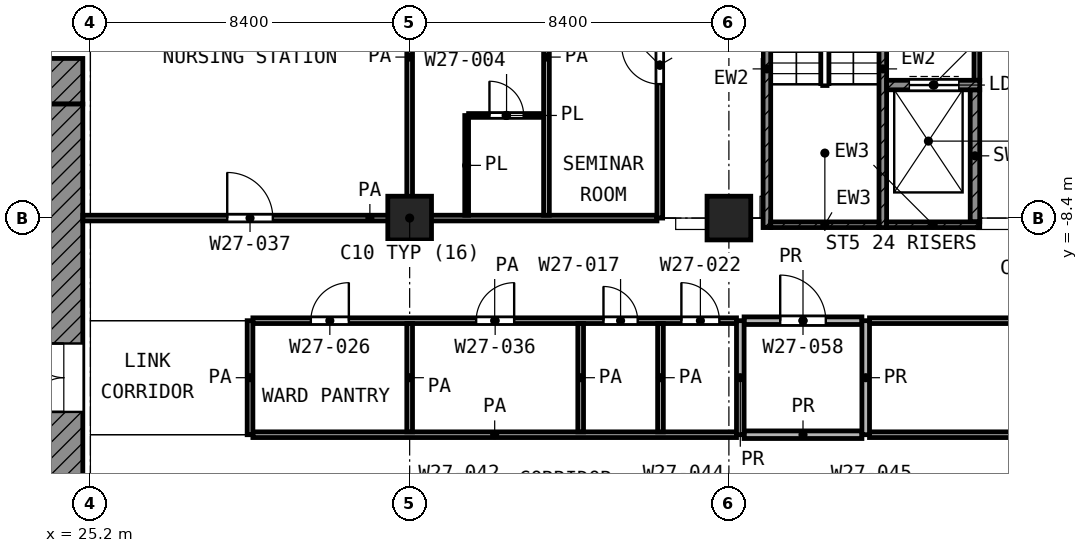
"""IFC4 building model, lengths in metres.
Left out: names, types, materials, properties, quantities, classifications, styles, units other than length and angle.
Written with IfcOpenShell. Run it as: python <this file> out.ifc"""

import sys

from ifc_helpers import new_model, si_unit, direction, frame, frame_2d, origin, origin_2d, place, context, subcontext, project, spatial, rectangle, extrude, element, fill, save


model = new_model("IFC4")
c1 = context("Model", 3, precision=1e-05, world=origin(), true_north=direction((0.0, 1.0)))
c2 = subcontext(c1, "Body", "Model", "MODEL_VIEW")
j1 = project(units=[si_unit("LENGTHUNIT", "METRE"), si_unit("PLANEANGLEUNIT", "RADIAN")], contexts=[c1])
p1 = place(None, origin())
s1 = spatial("IfcSite", under=j1, at=p1, CompositionType="ELEMENT")
p2 = place(p1, origin())
s2 = spatial("IfcBuilding", under=s1, at=p2, CompositionType="ELEMENT")
p3 = place(p2, frame((0.0, 0.0, 140.8)))
s3 = spatial("IfcBuildingStorey", under=s2, at=p3, CompositionType="ELEMENT", Elevation=140.8)
for number, where, z_axis, x_axis in (
    (1, (33.6, -8.4, 0.0), (0.0, 0.0, 1.0), (1.0, 0.0, 0.0)),
    (2, (42.0, -8.4, 0.0), (0.0, 0.0, 1.0), (1.0, 0.0, 0.0)),
):
    element("IfcColumn", number, at=place(p3, frame(where, z_axis=z_axis, x_axis=x_axis)), inside=s3, PredefinedType="COLUMN", context=c2, shape_type="SweptSolid", body=[
        extrude(rectangle(XDim=1.15, YDim=1.15, at=origin_2d()), origin(), (0.0, 0.0, 1.0), 4.2),
    ])
p4 = place(p3, frame((4.2, -4.8, 0.0), z_axis=(0.0, 0.0, 1.0), x_axis=(1.0, 0.0, 0.0)))
e3 = element("IfcWall", 3, at=p4, inside=s3, PredefinedType="SHEAR", context=c2, shape_type="SweptSolid", body=[
    extrude(rectangle(XDim=20.8, YDim=1.2, at=frame_2d((10.4, 0.0))), origin(), (0.0, 0.0, 1.0), 3.6),
])
p5 = place(p4, frame((1.95, 0.0, 0.0)))
e4 = element("IfcOpeningElement", 4, at=p5, cuts=e3, PredefinedType="OPENING", context=c2, shape_type="SweptSolid", body=[
    extrude(rectangle(XDim=1.1, YDim=2.1, at=frame_2d((0.55, 1.05))), frame((0.0, 0.61, 0.0), z_axis=(0.0, -1.0, 0.0), x_axis=(1.0, 0.0, 0.0)), (0.0, 0.0, 1.0), 1.22),
])
p6 = place(p4, frame((17.95, 0.0, 0.0)))
e5 = element("IfcOpeningElement", 5, at=p6, cuts=e3, PredefinedType="OPENING", context=c2, shape_type="SweptSolid", body=[
    extrude(rectangle(XDim=1.1, YDim=2.1, at=frame_2d((0.55, 1.05))), frame((0.0, 0.61, 0.0), z_axis=(0.0, -1.0, 0.0), x_axis=(1.0, 0.0, 0.0)), (0.0, 0.0, 1.0), 1.22),
])
p7 = place(p3, frame((24.5, -24.0, 0.0), z_axis=(0.0, 0.0, 1.0), x_axis=(0.0, 1.0, 0.0)))
e6 = element("IfcWall", 6, at=p7, inside=s3, PredefinedType="SHEAR", context=c2, shape_type="SweptSolid", body=[
    extrude(rectangle(XDim=18.6, YDim=1.0, at=frame_2d((9.3, 0.0))), origin(), (0.0, 0.0, 1.0), 3.6),
])
p8 = place(p7, frame((10.5, 0.0, 0.0)))
e7 = element("IfcOpeningElement", 7, at=p8, cuts=e6, PredefinedType="OPENING", context=c2, shape_type="SweptSolid", body=[
    extrude(rectangle(XDim=1.8, YDim=2.1, at=frame_2d((0.9, 1.05))), frame((0.0, 0.51, 0.0), z_axis=(0.0, -1.0, 0.0), x_axis=(1.0, 0.0, 0.0)), (0.0, 0.0, 1.0), 1.02),
])
p9 = place(p3, frame((43.0, -8.65, 0.0), z_axis=(0.0, 0.0, 1.0), x_axis=(0.0, 1.0, 0.0)))
e8 = element("IfcWall", 8, at=p9, inside=s3, PredefinedType="SHEAR", context=c2, shape_type="SweptSolid", body=[
    extrude(rectangle(XDim=8.35, YDim=0.2, at=frame_2d((4.175, 0.0))), origin(), (0.0, 0.0, 1.0), 3.6),
])
p10 = place(p9, frame((7.0, 0.0, 0.0)))
e9 = element("IfcOpeningElement", 9, at=p10, cuts=e8, PredefinedType="OPENING", context=c2, shape_type="SweptSolid", body=[
    extrude(rectangle(XDim=1.1, YDim=2.1, at=frame_2d((0.55, 1.05))), frame((0.0, 0.11, 0.0), z_axis=(0.0, -1.0, 0.0), x_axis=(1.0, 0.0, 0.0)), (0.0, 0.0, 1.0), 0.22),
])
p11 = place(p3, frame((46.05, -8.65, 0.0), z_axis=(0.0, 0.0, 1.0), x_axis=(0.0, 1.0, 0.0)))
e10 = element("IfcWall", 10, at=p11, inside=s3, PredefinedType="SHEAR", context=c2, shape_type="SweptSolid", body=[
    extrude(rectangle(XDim=8.35, YDim=0.2, at=frame_2d((4.175, 0.0))), origin(), (0.0, 0.0, 1.0), 3.6),
])
p12 = place(p11, frame((7.0, 0.0, 0.0)))
e11 = element("IfcOpeningElement", 11, at=p12, cuts=e10, PredefinedType="OPENING", context=c2, shape_type="SweptSolid", body=[
    extrude(rectangle(XDim=1.1, YDim=2.1, at=frame_2d((0.55, 1.05))), frame((0.0, 0.11, 0.0), z_axis=(0.0, -1.0, 0.0), x_axis=(1.0, 0.0, 0.0)), (0.0, 0.0, 1.0), 0.22),
])
p13 = place(p3, frame((43.1, -8.575, 0.0), z_axis=(0.0, 0.0, 1.0), x_axis=(1.0, 0.0, 0.0)))
e12 = element("IfcWall", 12, at=p13, inside=s3, PredefinedType="SHEAR", context=c2, shape_type="SweptSolid", body=[
    extrude(rectangle(XDim=2.85, YDim=0.15, at=frame_2d((1.425, 0.0))), origin(), (0.0, 0.0, 1.0), 3.6),
])
p14 = place(p3, frame((46.15, -8.575, 0.0), z_axis=(0.0, 0.0, 1.0), x_axis=(1.0, 0.0, 0.0)))
e13 = element("IfcWall", 13, at=p14, inside=s3, PredefinedType="SHEAR", context=c2, shape_type="SweptSolid", body=[
    extrude(rectangle(XDim=2.45, YDim=0.15, at=frame_2d((1.225, 0.0))), origin(), (0.0, 0.0, 1.0), 3.6),
])
p15 = place(p3, frame((46.15, -4.9, 0.0), z_axis=(0.0, 0.0, 1.0), x_axis=(1.0, 0.0, 0.0)))
e14 = element("IfcWall", 14, at=p15, inside=s3, PredefinedType="SHEAR", context=c2, shape_type="SweptSolid", body=[
    extrude(rectangle(XDim=2.45, YDim=0.25, at=frame_2d((1.225, 0.0))), origin(), (0.0, 0.0, 1.0), 3.6),
])
p16 = place(p15, frame((0.6, 0.0, 0.0)))
e15 = element("IfcOpeningElement", 15, at=p16, cuts=e14, PredefinedType="OPENING", context=c2, shape_type="SweptSolid", body=[
    extrude(rectangle(XDim=1.3, YDim=2.1, at=frame_2d((0.65, 1.05))), frame((0.0, 0.135, 0.0), z_axis=(0.0, -1.0, 0.0), x_axis=(1.0, 0.0, 0.0)), (0.0, 0.0, 1.0), 0.27),
])
p17 = place(p3, frame((48.475, -8.5, 0.0), z_axis=(0.0, 0.0, 1.0), x_axis=(0.0, 1.0, 0.0)))
e16 = element("IfcWall", 16, at=p17, inside=s3, PredefinedType="SHEAR", context=c2, shape_type="SweptSolid", body=[
    extrude(rectangle(XDim=3.475, YDim=0.25, at=frame_2d((1.738, 0.0))), origin(), (0.0, 0.0, 1.0), 3.6),
])
p18 = place(p3, frame((48.525, -4.775, 0.0), z_axis=(0.0, 0.0, 1.0), x_axis=(0.0, 1.0, 0.0)))
e17 = element("IfcWall", 17, at=p18, inside=s3, PredefinedType="PARTITIONING", context=c2, shape_type="SweptSolid", body=[
    extrude(rectangle(XDim=4.325, YDim=0.15, at=frame_2d((2.163, 0.0))), origin(), (0.0, 0.0, 1.0), 3.6),
])
p19 = place(p18, frame((1.625, 0.0, 0.0)))
e18 = element("IfcOpeningElement", 18, at=p19, cuts=e17, PredefinedType="OPENING", context=c2, shape_type="SweptSolid", body=[
    extrude(rectangle(XDim=1.1, YDim=2.1, at=frame_2d((0.55, 1.05))), frame((0.0, 0.085, 0.0), z_axis=(0.0, -1.0, 0.0), x_axis=(1.0, 0.0, 0.0)), (0.0, 0.0, 1.0), 0.17),
])
p20 = place(p3, frame((35.151, -5.7, 0.0), z_axis=(0.0, 0.0, 1.0), x_axis=(1.0, 0.0, 0.0)))
e19 = element("IfcWall", 19, at=p20, inside=s3, PredefinedType="PARTITIONING", context=c2, shape_type="SweptSolid", body=[
    extrude(rectangle(XDim=1.974, YDim=0.1, at=frame_2d((0.987, 0.0))), origin(), (0.0, 0.0, 1.0), 3.6),
])
p21 = place(p20, frame((0.549, 0.0, 0.0)))
e20 = element("IfcOpeningElement", 20, at=p21, cuts=e19, PredefinedType="OPENING", context=c2, shape_type="SweptSolid", body=[
    extrude(rectangle(XDim=0.9, YDim=2.1, at=frame_2d((0.45, 1.05))), frame((0.0, 0.06, 0.0), z_axis=(0.0, -1.0, 0.0), x_axis=(1.0, 0.0, 0.0)), (0.0, 0.0, 1.0), 0.12),
])
p22 = place(p3, frame((35.1, -8.325, 0.0), z_axis=(0.0, 0.0, 1.0), x_axis=(0.0, 1.0, 0.0)))
e21 = element("IfcWall", 21, at=p22, inside=s3, PredefinedType="PARTITIONING", context=c2, shape_type="SweptSolid", body=[
    extrude(rectangle(XDim=2.623, YDim=0.1, at=frame_2d((1.312, 0.0))), origin(), (0.0, 0.0, 1.0), 3.6),
])
p23 = place(p3, frame((29.475, -14.1, 0.0), z_axis=(0.0, 0.0, 1.0), x_axis=(1.0, 0.0, 0.0)))
e22 = element("IfcWall", 22, at=p23, inside=s3, PredefinedType="PARTITIONING", context=c2, shape_type="SweptSolid", body=[
    extrude(rectangle(XDim=12.725, YDim=0.15, at=frame_2d((6.362, 0.0))), origin(), (0.0, 0.0, 1.0), 3.6),
])
p24 = place(p3, frame((45.7, -14.1, 0.0), z_axis=(0.0, 0.0, 1.0), x_axis=(1.0, 0.0, 0.0)))
e23 = element("IfcWall", 23, at=p24, inside=s3, PredefinedType="PARTITIONING", context=c2, shape_type="SweptSolid", body=[
    extrude(rectangle(XDim=27.125, YDim=0.15, at=frame_2d((13.562, 0.0))), origin(), (0.0, 0.0, 1.0), 3.6),
])
p25 = place(p24, frame((5.9, 0.0, 0.0)))
e24 = element("IfcOpeningElement", 24, at=p25, cuts=e23, PredefinedType="OPENING", context=c2, shape_type="SweptSolid", body=[
    extrude(rectangle(XDim=1.2, YDim=2.1, at=frame_2d((0.6, 1.05))), frame((0.0, 0.085, 0.0), z_axis=(0.0, -1.0, 0.0), x_axis=(1.0, 0.0, 0.0)), (0.0, 0.0, 1.0), 0.17),
])
p26 = place(p24, frame((19.65, 0.0, 0.0)))
e25 = element("IfcOpeningElement", 25, at=p26, cuts=e23, PredefinedType="OPENING", context=c2, shape_type="SweptSolid", body=[
    extrude(rectangle(XDim=1.0, YDim=2.1, at=frame_2d((0.5, 1.05))), frame((0.0, 0.085, 0.0), z_axis=(0.0, -1.0, 0.0), x_axis=(1.0, 0.0, 0.0)), (0.0, 0.0, 1.0), 0.17),
])
p27 = place(p3, frame((29.475, -11.1, 0.0), z_axis=(0.0, 0.0, 1.0), x_axis=(1.0, 0.0, 0.0)))
e26 = element("IfcWall", 26, at=p27, inside=s3, PredefinedType="PARTITIONING", context=c2, shape_type="SweptSolid", body=[
    extrude(rectangle(XDim=12.725, YDim=0.15, at=frame_2d((6.362, 0.0))), origin(), (0.0, 0.0, 1.0), 3.6),
])
p28 = place(p27, frame((1.525, 0.0, 0.0)))
e27 = element("IfcOpeningElement", 27, at=p28, cuts=e26, PredefinedType="OPENING", context=c2, shape_type="SweptSolid", body=[
    extrude(rectangle(XDim=1.0, YDim=2.1, at=frame_2d((0.5, 1.05))), frame((0.0, 0.085, 0.0), z_axis=(0.0, -1.0, 0.0), x_axis=(1.0, 0.0, 0.0)), (0.0, 0.0, 1.0), 0.17),
])
p29 = place(p27, frame((9.225, 0.0, 0.0)))
e28 = element("IfcOpeningElement", 28, at=p29, cuts=e26, PredefinedType="OPENING", context=c2, shape_type="SweptSolid", body=[
    extrude(rectangle(XDim=0.9, YDim=2.1, at=frame_2d((0.45, 1.05))), frame((0.0, 0.085, 0.0), z_axis=(0.0, -1.0, 0.0), x_axis=(1.0, 0.0, 0.0)), (0.0, 0.0, 1.0), 0.17),
])
p30 = place(p27, frame((11.275, 0.0, 0.0)))
e29 = element("IfcOpeningElement", 29, at=p30, cuts=e26, PredefinedType="OPENING", context=c2, shape_type="SweptSolid", body=[
    extrude(rectangle(XDim=1.0, YDim=2.1, at=frame_2d((0.5, 1.05))), frame((0.0, 0.085, 0.0), z_axis=(0.0, -1.0, 0.0), x_axis=(1.0, 0.0, 0.0)), (0.0, 0.0, 1.0), 0.17),
])
p31 = place(p27, frame((5.875, 0.0, 0.0)))
e30 = element("IfcOpeningElement", 30, at=p31, cuts=e26, PredefinedType="OPENING", context=c2, shape_type="SweptSolid", body=[
    extrude(rectangle(XDim=1.0, YDim=2.1, at=frame_2d((0.5, 1.05))), frame((0.0, 0.085, 0.0), z_axis=(0.0, -1.0, 0.0), x_axis=(1.0, 0.0, 0.0)), (0.0, 0.0, 1.0), 0.17),
])
p32 = place(p3, frame((45.7, -11.1, 0.0), z_axis=(0.0, 0.0, 1.0), x_axis=(1.0, 0.0, 0.0)))
e31 = element("IfcWall", 31, at=p32, inside=s3, PredefinedType="PARTITIONING", context=c2, shape_type="SweptSolid", body=[
    extrude(rectangle(XDim=27.125, YDim=0.15, at=frame_2d((13.562, 0.0))), origin(), (0.0, 0.0, 1.0), 3.6),
])
p33 = place(p3, frame((25.0, -8.4, 0.0), z_axis=(0.0, 0.0, 1.0), x_axis=(1.0, 0.0, 0.0)))
e32 = element("IfcWall", 32, at=p33, inside=s3, PredefinedType="PARTITIONING", context=c2, shape_type="SweptSolid", body=[
    extrude(rectangle(XDim=15.107, YDim=0.15, at=frame_2d((7.553, 0.0))), origin(), (0.0, 0.0, 1.0), 3.6),
])
p34 = place(p33, frame((3.8, 0.0, 0.0)))
e33 = element("IfcOpeningElement", 33, at=p34, cuts=e32, PredefinedType="OPENING", context=c2, shape_type="SweptSolid", body=[
    extrude(rectangle(XDim=1.2, YDim=2.1, at=frame_2d((0.6, 1.05))), frame((0.0, 0.085, 0.0), z_axis=(0.0, -1.0, 0.0), x_axis=(1.0, 0.0, 0.0)), (0.0, 0.0, 1.0), 0.17),
])
p35 = place(p3, frame((29.4, -14.1, 0.0), z_axis=(0.0, 0.0, 1.0), x_axis=(0.0, 1.0, 0.0)))
e34 = element("IfcWall", 34, at=p35, inside=s3, PredefinedType="PARTITIONING", context=c2, shape_type="SweptSolid", body=[
    extrude(rectangle(XDim=3.0, YDim=0.15, at=frame_2d((1.5, 0.0))), origin(), (0.0, 0.0, 1.0), 3.6),
])
p36 = place(p3, frame((33.6, -14.025, 0.0), z_axis=(0.0, 0.0, 1.0), x_axis=(0.0, 1.0, 0.0)))
e35 = element("IfcWall", 35, at=p36, inside=s3, PredefinedType="PARTITIONING", context=c2, shape_type="SweptSolid", body=[
    extrude(rectangle(XDim=2.85, YDim=0.15, at=frame_2d((1.425, 0.0))), origin(), (0.0, 0.0, 1.0), 3.6),
])
for number, where, z_axis, x_axis in (
    (36, (33.6, -8.325, 0.0), (0.0, 0.0, 1.0), (0.0, 1.0, 0.0)),
    (37, (37.2, -8.325, 0.0), (0.0, 0.0, 1.0), (0.0, 1.0, 0.0)),
):
    element("IfcWall", number, at=place(p3, frame(where, z_axis=z_axis, x_axis=x_axis)), inside=s3, PredefinedType="PARTITIONING", context=c2, shape_type="SweptSolid", body=[
        extrude(rectangle(XDim=8.322, YDim=0.15, at=frame_2d((4.161, 0.0))), origin(), (0.0, 0.0, 1.0), 3.6),
    ])
p37 = place(p3, frame((38.1, -14.025, 0.0), z_axis=(0.0, 0.0, 1.0), x_axis=(0.0, 1.0, 0.0)))
e38 = element("IfcWall", 38, at=p37, inside=s3, PredefinedType="PARTITIONING", context=c2, shape_type="SweptSolid", body=[
    extrude(rectangle(XDim=2.85, YDim=0.15, at=frame_2d((1.425, 0.0))), origin(), (0.0, 0.0, 1.0), 3.6),
])
p38 = place(p3, frame((40.182, -8.4, 0.0), z_axis=(0.0, 0.0, 1.0), x_axis=(0.0, 1.0, 0.0)))
e39 = element("IfcWall", 39, at=p38, inside=s3, PredefinedType="PARTITIONING", context=c2, shape_type="SweptSolid", body=[
    extrude(rectangle(XDim=8.05, YDim=0.15, at=frame_2d((4.025, 0.0))), origin(), (0.0, 0.0, 1.0), 3.6),
])
p39 = place(p38, frame((3.525, 0.0, 0.0)))
e40 = element("IfcOpeningElement", 40, at=p39, cuts=e39, PredefinedType="OPENING", context=c2, shape_type="SweptSolid", body=[
    extrude(rectangle(XDim=1.0, YDim=2.1, at=frame_2d((0.5, 1.05))), frame((0.0, 0.085, 0.0), z_axis=(0.0, -1.0, 0.0), x_axis=(1.0, 0.0, 0.0)), (0.0, 0.0, 1.0), 0.17),
])
p40 = place(p3, frame((40.2, -14.025, 0.0), z_axis=(0.0, 0.0, 1.0), x_axis=(0.0, 1.0, 0.0)))
e41 = element("IfcWall", 41, at=p40, inside=s3, PredefinedType="PARTITIONING", context=c2, shape_type="SweptSolid", body=[
    extrude(rectangle(XDim=2.85, YDim=0.15, at=frame_2d((1.425, 0.0))), origin(), (0.0, 0.0, 1.0), 3.6),
])
p41 = place(p3, frame((42.4, -14.1, 0.0), z_axis=(0.0, 0.0, 1.0), x_axis=(1.0, 0.0, 0.0)))
e42 = element("IfcWall", 42, at=p41, inside=s3, PredefinedType="PARTITIONING", context=c2, shape_type="SweptSolid", body=[
    extrude(rectangle(XDim=3.1, YDim=0.2, at=frame_2d((1.55, 0.0))), origin(), (0.0, 0.0, 1.0), 3.6),
])
p42 = place(p3, frame((42.4, -11.1, 0.0), z_axis=(0.0, 0.0, 1.0), x_axis=(1.0, 0.0, 0.0)))
e43 = element("IfcWall", 43, at=p42, inside=s3, PredefinedType="PARTITIONING", context=c2, shape_type="SweptSolid", body=[
    extrude(rectangle(XDim=3.1, YDim=0.2, at=frame_2d((1.55, 0.0))), origin(), (0.0, 0.0, 1.0), 3.6),
])
p43 = place(p42, frame((0.95, 0.0, 0.0)))
e44 = element("IfcOpeningElement", 44, at=p43, cuts=e43, PredefinedType="OPENING", context=c2, shape_type="SweptSolid", body=[
    extrude(rectangle(XDim=1.2, YDim=2.1, at=frame_2d((0.6, 1.05))), frame((0.0, 0.11, 0.0), z_axis=(0.0, -1.0, 0.0), x_axis=(1.0, 0.0, 0.0)), (0.0, 0.0, 1.0), 0.22),
])
for number, where, z_axis, x_axis in (
    (45, (42.3, -14.1, 0.0), (0.0, 0.0, 1.0), (0.0, 1.0, 0.0)),
    (46, (45.6, -14.1, 0.0), (0.0, 0.0, 1.0), (0.0, 1.0, 0.0)),
):
    element("IfcWall", number, at=place(p3, frame(where, z_axis=z_axis, x_axis=x_axis)), inside=s3, PredefinedType="PARTITIONING", context=c2, shape_type="SweptSolid", body=[
        extrude(rectangle(XDim=3.0, YDim=0.2, at=frame_2d((1.5, 0.0))), origin(), (0.0, 0.0, 1.0), 3.6),
    ])
p44 = place(p8, origin())
e47 = element("IfcDoor", 47, at=p44, inside=s3, OperationType="DOUBLE_DOOR_SINGLE_SWING", PredefinedType="DOOR", context=c2, shape_type="SweptSolid", body=[
    extrude(rectangle(XDim=1.8, YDim=2.1, at=frame_2d((0.9, 1.05))), frame((0.0, 0.025, 0.0), z_axis=(0.0, -1.0, 0.0), x_axis=(1.0, 0.0, 0.0)), (0.0, 0.0, 1.0), 0.05),
])
fill(e7, e47)
p45 = place(p16, origin())
e48 = element("IfcDoor", 48, at=p45, inside=s3, OperationType="DOUBLE_DOOR_SLIDING", PredefinedType="DOOR", context=c2, shape_type="SweptSolid", body=[
    extrude(rectangle(XDim=1.3, YDim=2.1, at=frame_2d((0.65, 1.05))), frame((0.0, 0.025, 0.0), z_axis=(0.0, -1.0, 0.0), x_axis=(1.0, 0.0, 0.0)), (0.0, 0.0, 1.0), 0.05),
])
fill(e15, e48)
p46 = place(p34, origin())
e49 = element("IfcDoor", 49, at=p46, inside=s3, OperationType="SINGLE_SWING_LEFT", PredefinedType="DOOR", context=c2, shape_type="SweptSolid", body=[
    extrude(rectangle(XDim=1.2, YDim=2.1, at=frame_2d((0.6, 1.05))), frame((0.0, 0.025, 0.0), z_axis=(0.0, -1.0, 0.0), x_axis=(1.0, 0.0, 0.0)), (0.0, 0.0, 1.0), 0.05),
])
fill(e33, e49)
p47 = place(p21, origin())
e50 = element("IfcDoor", 50, at=p47, inside=s3, OperationType="SINGLE_SWING_LEFT", PredefinedType="DOOR", context=c2, shape_type="SweptSolid", body=[
    extrude(rectangle(XDim=0.9, YDim=2.1, at=frame_2d((0.45, 1.05))), frame((0.0, 0.025, 0.0), z_axis=(0.0, -1.0, 0.0), x_axis=(1.0, 0.0, 0.0)), (0.0, 0.0, 1.0), 0.05),
])
fill(e20, e50)
p48 = place(p39, origin())
e51 = element("IfcDoor", 51, at=p48, inside=s3, OperationType="SINGLE_SWING_RIGHT", PredefinedType="DOOR", context=c2, shape_type="SweptSolid", body=[
    extrude(rectangle(XDim=1.0, YDim=2.1, at=frame_2d((0.5, 1.05))), frame((0.0, 0.025, 0.0), z_axis=(0.0, -1.0, 0.0), x_axis=(1.0, 0.0, 0.0)), (0.0, 0.0, 1.0), 0.05),
])
fill(e40, e51)
p49 = place(p28, origin())
e52 = element("IfcDoor", 52, at=p49, inside=s3, OperationType="SINGLE_SWING_RIGHT", PredefinedType="DOOR", context=c2, shape_type="SweptSolid", body=[
    extrude(rectangle(XDim=1.0, YDim=2.1, at=frame_2d((0.5, 1.05))), frame((0.0, 0.025, 0.0), z_axis=(0.0, -1.0, 0.0), x_axis=(1.0, 0.0, 0.0)), (0.0, 0.0, 1.0), 0.05),
])
fill(e27, e52)
p50 = place(p29, origin())
e53 = element("IfcDoor", 53, at=p50, inside=s3, OperationType="SINGLE_SWING_LEFT", PredefinedType="DOOR", context=c2, shape_type="SweptSolid", body=[
    extrude(rectangle(XDim=0.9, YDim=2.1, at=frame_2d((0.45, 1.05))), frame((0.0, 0.025, 0.0), z_axis=(0.0, -1.0, 0.0), x_axis=(1.0, 0.0, 0.0)), (0.0, 0.0, 1.0), 0.05),
])
fill(e28, e53)
p51 = place(p30, origin())
e54 = element("IfcDoor", 54, at=p51, inside=s3, OperationType="SINGLE_SWING_LEFT", PredefinedType="DOOR", context=c2, shape_type="SweptSolid", body=[
    extrude(rectangle(XDim=1.0, YDim=2.1, at=frame_2d((0.5, 1.05))), frame((0.0, 0.025, 0.0), z_axis=(0.0, -1.0, 0.0), x_axis=(1.0, 0.0, 0.0)), (0.0, 0.0, 1.0), 0.05),
])
fill(e29, e54)
p52 = place(p43, origin())
e55 = element("IfcDoor", 55, at=p52, inside=s3, OperationType="SINGLE_SWING_LEFT", PredefinedType="DOOR", context=c2, shape_type="SweptSolid", body=[
    extrude(rectangle(XDim=1.2, YDim=2.1, at=frame_2d((0.6, 1.05))), frame((0.0, 0.025, 0.0), z_axis=(0.0, -1.0, 0.0), x_axis=(1.0, 0.0, 0.0)), (0.0, 0.0, 1.0), 0.05),
])
fill(e44, e55)
p53 = place(p31, origin())
e56 = element("IfcDoor", 56, at=p53, inside=s3, OperationType="SINGLE_SWING_RIGHT", PredefinedType="DOOR", context=c2, shape_type="SweptSolid", body=[
    extrude(rectangle(XDim=1.0, YDim=2.1, at=frame_2d((0.5, 1.05))), frame((0.0, 0.025, 0.0), z_axis=(0.0, -1.0, 0.0), x_axis=(1.0, 0.0, 0.0)), (0.0, 0.0, 1.0), 0.05),
])
fill(e30, e56)
save(model, sys.argv[1])
